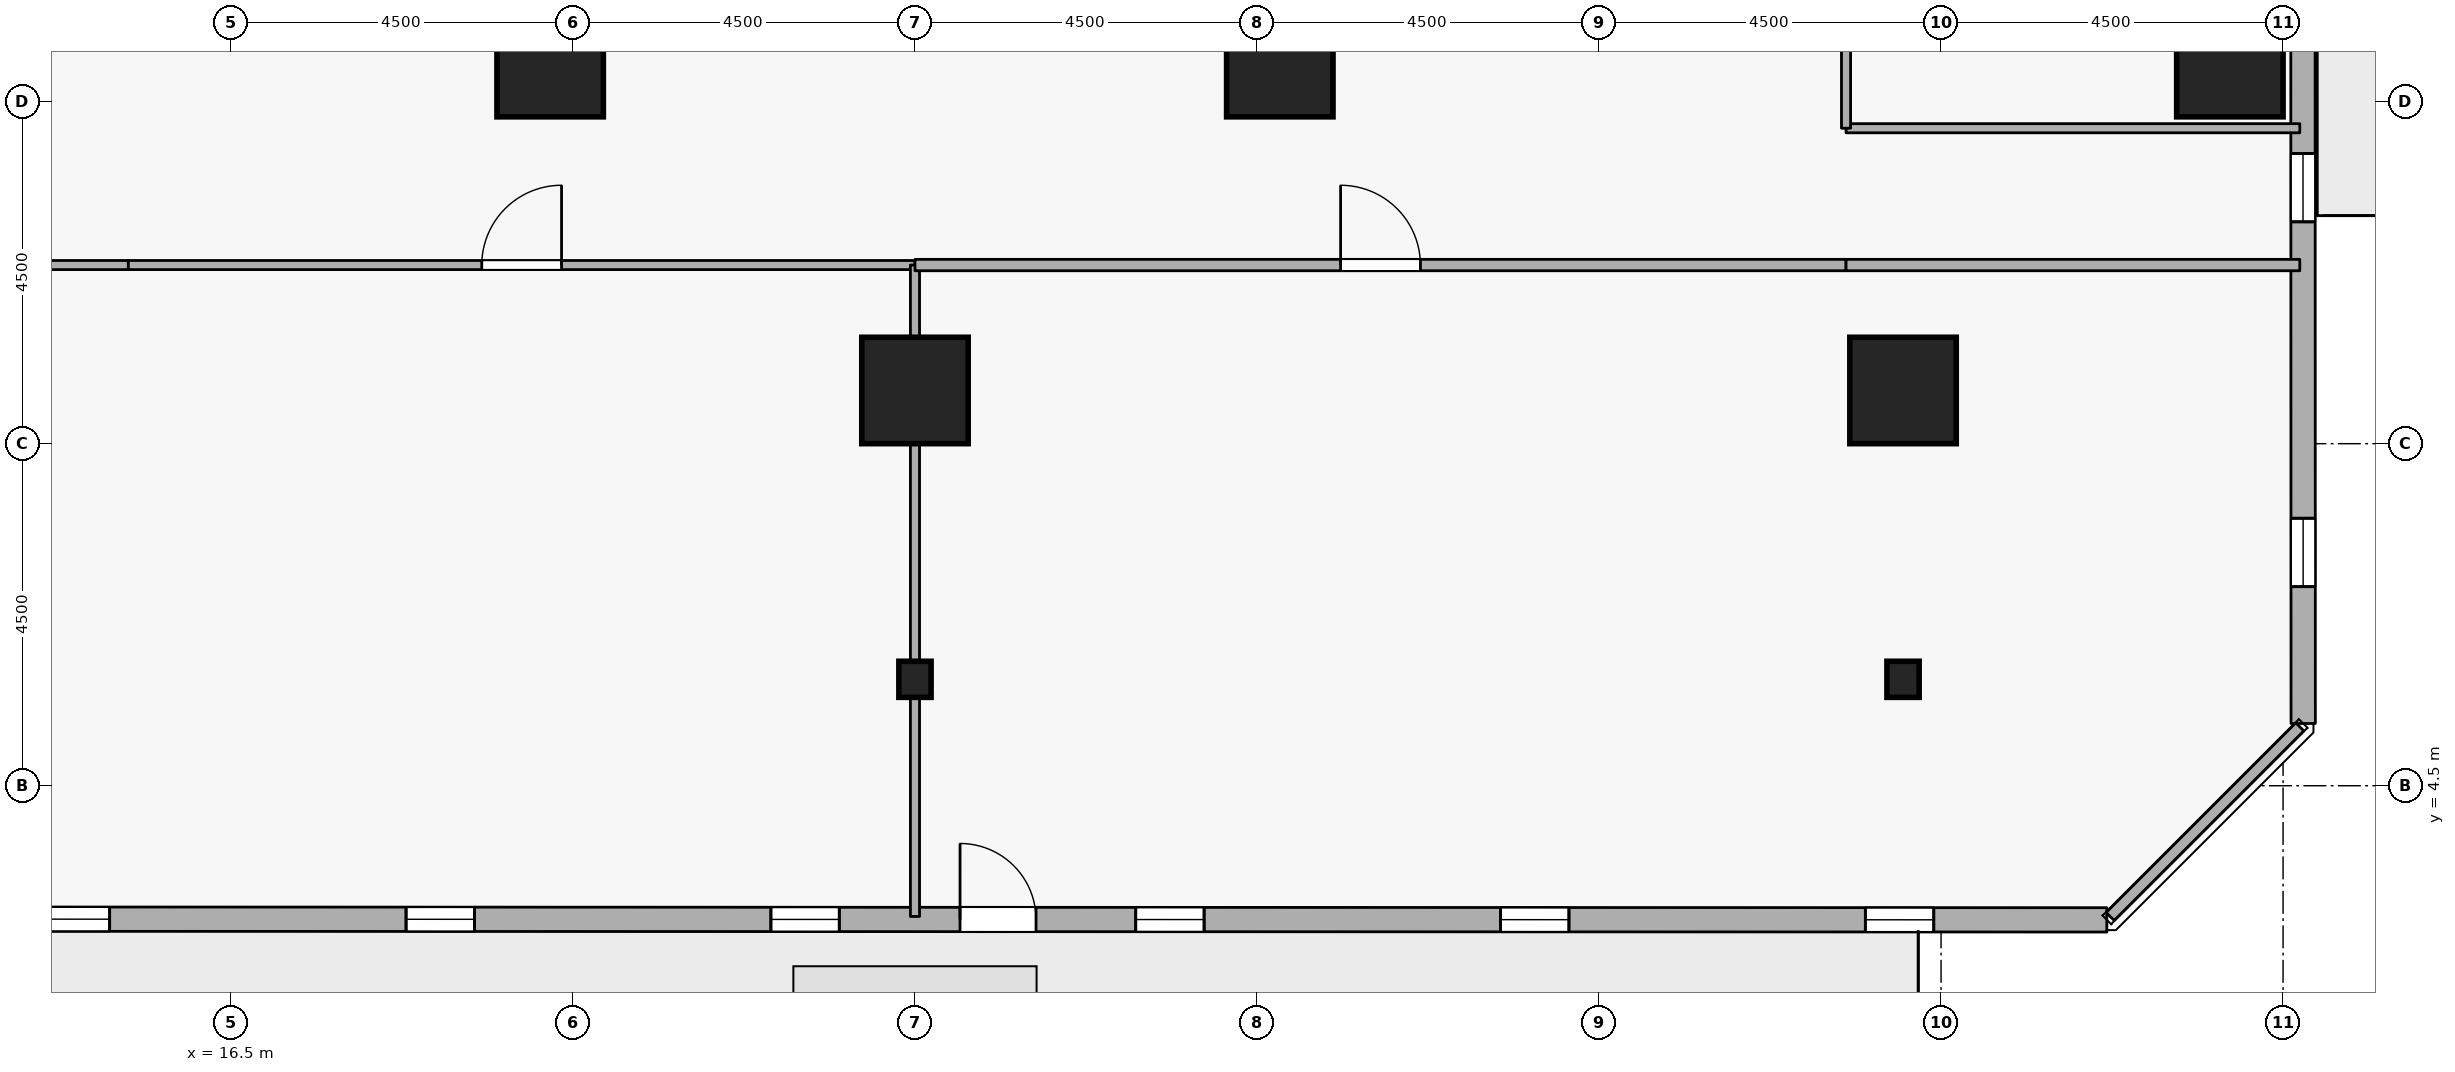
"""IFC4 building model, lengths in metres.
Left out: names, types, materials, properties, quantities, classifications, styles, units other than length and angle.
Written with IfcOpenShell. Run it as: python <this file> out.ifc"""

import sys

from ifc_helpers import new_model, si_unit, direction, frame, frame_2d, origin, origin_2d, place, context, subcontext, project, spatial, rectangle, i_section, extrude, element, fill, save


model = new_model("IFC4")
c1 = context("Model", 3, precision=1e-05, world=origin(), true_north=direction((0.0, 1.0)))
c2 = subcontext(c1, "Body", "Model", "MODEL_VIEW")
j1 = project(units=[si_unit("LENGTHUNIT", "METRE"), si_unit("PLANEANGLEUNIT", "RADIAN")], contexts=[c1])
p1 = place(None, origin())
s1 = spatial("IfcSite", under=j1, at=p1, CompositionType="ELEMENT")
p2 = place(p1, origin())
s2 = spatial("IfcBuilding", under=s1, at=p2, CompositionType="ELEMENT")
p3 = place(p2, frame((0.0, 0.0, 27.9)))
s3 = spatial("IfcBuildingStorey", under=s2, at=p3, CompositionType="ELEMENT", Elevation=27.9)
for number, where, z_axis, x_axis in (
    (1, (25.5, 9.7, 0.0), (0.0, 0.0, 1.0), (1.0, 0.0, 0.0)),
    (2, (38.5, 9.7, 0.0), (0.0, 0.0, 1.0), (1.0, 0.0, 0.0)),
    (3, (42.8, 14.0, 0.0), (0.0, 0.0, 1.0), (1.0, 0.0, 0.0)),
    (4, (20.7, 14.0, 0.0), (0.0, 0.0, 1.0), (1.0, 0.0, 0.0)),
    (5, (30.3, 14.0, 0.0), (0.0, 0.0, 1.0), (1.0, 0.0, 0.0)),
):
    element("IfcColumn", number, at=place(p3, frame(where, z_axis=z_axis, x_axis=x_axis)), inside=s3, PredefinedType="COLUMN", context=c2, shape_type="SweptSolid", body=[
        extrude(rectangle(XDim=1.4, YDim=1.4, at=origin_2d()), origin(), (0.0, 0.0, 1.0), 3.6),
    ])
for number, where, z_axis, x_axis in (
    (6, (25.5, 5.9, 0.0), (0.0, 0.0, 1.0), (1.0, 0.0, 0.0)),
    (7, (38.5, 5.9, 0.0), (0.0, 0.0, 1.0), (1.0, 0.0, 0.0)),
):
    element("IfcColumn", number, at=place(p3, frame(where, z_axis=z_axis, x_axis=x_axis)), inside=s3, PredefinedType="COLUMN", context=c2, shape_type="SweptSolid", body=[
        extrude(i_section(OverallWidth=0.424, OverallDepth=0.475, WebThickness=0.048, FlangeThickness=0.077, FilletRadius=0.015, at=origin_2d()), origin(), (0.0, 0.0, 1.0), 3.6),
    ])
p4 = place(p3, frame((7.404, 2.747, 0.0), z_axis=(0.0, 0.0, 1.0), x_axis=(0.999999942296, -0.000339718087, 0.0)))
e8 = element("IfcWall", 8, at=p4, inside=s3, PredefinedType="STANDARD", context=c2, shape_type="SweptSolid", body=[
    extrude(rectangle(XDim=33.777, YDim=0.32, at=frame_2d((16.888, 0.0))), origin(), (0.0, 0.0, 1.0), 2.7),
])
p5 = place(p4, frame((18.688, 0.0, 0.0)))
e9 = element("IfcOpeningElement", 9, at=p5, cuts=e8, PredefinedType="OPENING", context=c2, shape_type="SweptSolid", body=[
    extrude(rectangle(XDim=1.0, YDim=2.08, at=frame_2d((0.5, 1.04))), frame((0.0, 0.17, 0.0), z_axis=(0.0, -1.0, 0.0), x_axis=(1.0, 0.0, 0.0)), (0.0, 0.0, 1.0), 0.34),
])
p6 = place(p4, frame((1.8, 0.0, 0.72)))
e10 = element("IfcOpeningElement", 10, at=p6, cuts=e8, PredefinedType="OPENING", context=c2, shape_type="SweptSolid", body=[
    extrude(rectangle(XDim=0.9, YDim=1.75, at=frame_2d((0.45, 0.875))), frame((0.0, 0.17, 0.0), z_axis=(0.0, -1.0, 0.0), x_axis=(1.0, 0.0, 0.0)), (0.0, 0.0, 1.0), 0.34),
])
p7 = place(p4, frame((6.6, 0.0, 0.72)))
e11 = element("IfcOpeningElement", 11, at=p7, cuts=e8, PredefinedType="OPENING", context=c2, shape_type="SweptSolid", body=[
    extrude(rectangle(XDim=0.9, YDim=1.75, at=frame_2d((0.45, 0.875))), frame((0.0, 0.17, 0.0), z_axis=(0.0, -1.0, 0.0), x_axis=(1.0, 0.0, 0.0)), (0.0, 0.0, 1.0), 0.34),
])
p8 = place(p4, frame((11.4, 0.0, 0.72)))
e12 = element("IfcOpeningElement", 12, at=p8, cuts=e8, PredefinedType="OPENING", context=c2, shape_type="SweptSolid", body=[
    extrude(rectangle(XDim=0.9, YDim=1.75, at=frame_2d((0.45, 0.875))), frame((0.0, 0.17, 0.0), z_axis=(0.0, -1.0, 0.0), x_axis=(1.0, 0.0, 0.0)), (0.0, 0.0, 1.0), 0.34),
])
p9 = place(p4, frame((16.2, 0.0, 0.72)))
e13 = element("IfcOpeningElement", 13, at=p9, cuts=e8, PredefinedType="OPENING", context=c2, shape_type="SweptSolid", body=[
    extrude(rectangle(XDim=0.9, YDim=1.75, at=frame_2d((0.45, 0.875))), frame((0.0, 0.17, 0.0), z_axis=(0.0, -1.0, 0.0), x_axis=(1.0, 0.0, 0.0)), (0.0, 0.0, 1.0), 0.34),
])
p10 = place(p4, frame((21.0, 0.0, 0.72)))
e14 = element("IfcOpeningElement", 14, at=p10, cuts=e8, PredefinedType="OPENING", context=c2, shape_type="SweptSolid", body=[
    extrude(rectangle(XDim=0.9, YDim=1.75, at=frame_2d((0.45, 0.875))), frame((0.0, 0.17, 0.0), z_axis=(0.0, -1.0, 0.0), x_axis=(1.0, 0.0, 0.0)), (0.0, 0.0, 1.0), 0.34),
])
p11 = place(p4, frame((25.8, 0.0, 0.72)))
e15 = element("IfcOpeningElement", 15, at=p11, cuts=e8, PredefinedType="OPENING", context=c2, shape_type="SweptSolid", body=[
    extrude(rectangle(XDim=0.9, YDim=1.75, at=frame_2d((0.45, 0.875))), frame((0.0, 0.17, 0.0), z_axis=(0.0, -1.0, 0.0), x_axis=(1.0, 0.0, 0.0)), (0.0, 0.0, 1.0), 0.34),
])
p12 = place(p4, frame((30.6, 0.0, 0.72)))
e16 = element("IfcOpeningElement", 16, at=p12, cuts=e8, PredefinedType="OPENING", context=c2, shape_type="SweptSolid", body=[
    extrude(rectangle(XDim=0.9, YDim=1.75, at=frame_2d((0.45, 0.875))), frame((0.0, 0.17, 0.0), z_axis=(0.0, -1.0, 0.0), x_axis=(1.0, 0.0, 0.0)), (0.0, 0.0, 1.0), 0.34),
])
p13 = place(p3, frame((43.765, 5.319, 0.0), z_axis=(0.0, 0.0, 1.0), x_axis=(-0.000339718087, 0.999999942296, 0.0)))
e17 = element("IfcWall", 17, at=p13, inside=s3, PredefinedType="STANDARD", context=c2, shape_type="SweptSolid", body=[
    extrude(rectangle(XDim=33.777, YDim=0.32, at=frame_2d((16.888, 0.0))), origin(), (0.0, 0.0, 1.0), 2.7),
])
p14 = place(p13, frame((18.614, 0.0, 0.0)))
e18 = element("IfcOpeningElement", 18, at=p14, cuts=e17, PredefinedType="OPENING", context=c2, shape_type="SweptSolid", body=[
    extrude(rectangle(XDim=1.15, YDim=2.1, at=frame_2d((0.575, 1.05))), frame((0.0, 0.17, 0.0), z_axis=(0.0, -1.0, 0.0), x_axis=(1.0, 0.0, 0.0)), (0.0, 0.0, 1.0), 0.34),
])
p15 = place(p13, frame((1.8, 0.0, 0.72)))
e19 = element("IfcOpeningElement", 19, at=p15, cuts=e17, PredefinedType="OPENING", context=c2, shape_type="SweptSolid", body=[
    extrude(rectangle(XDim=0.9, YDim=1.75, at=frame_2d((0.45, 0.875))), frame((0.0, 0.17, 0.0), z_axis=(0.0, -1.0, 0.0), x_axis=(1.0, 0.0, 0.0)), (0.0, 0.0, 1.0), 0.34),
])
p16 = place(p13, frame((6.6, 0.0, 0.72)))
e20 = element("IfcOpeningElement", 20, at=p16, cuts=e17, PredefinedType="OPENING", context=c2, shape_type="SweptSolid", body=[
    extrude(rectangle(XDim=0.9, YDim=1.75, at=frame_2d((0.45, 0.875))), frame((0.0, 0.17, 0.0), z_axis=(0.0, -1.0, 0.0), x_axis=(1.0, 0.0, 0.0)), (0.0, 0.0, 1.0), 0.34),
])
p17 = place(p13, frame((11.4, 0.0, 0.72)))
e21 = element("IfcOpeningElement", 21, at=p17, cuts=e17, PredefinedType="OPENING", context=c2, shape_type="SweptSolid", body=[
    extrude(rectangle(XDim=0.9, YDim=1.75, at=frame_2d((0.45, 0.875))), frame((0.0, 0.17, 0.0), z_axis=(0.0, -1.0, 0.0), x_axis=(1.0, 0.0, 0.0)), (0.0, 0.0, 1.0), 0.34),
])
p18 = place(p13, frame((16.2, 0.0, 0.72)))
e22 = element("IfcOpeningElement", 22, at=p18, cuts=e17, PredefinedType="OPENING", context=c2, shape_type="SweptSolid", body=[
    extrude(rectangle(XDim=0.9, YDim=1.75, at=frame_2d((0.45, 0.875))), frame((0.0, 0.17, 0.0), z_axis=(0.0, -1.0, 0.0), x_axis=(1.0, 0.0, 0.0)), (0.0, 0.0, 1.0), 0.34),
])
p19 = place(p13, frame((25.8, 0.0, 0.72)))
e23 = element("IfcOpeningElement", 23, at=p19, cuts=e17, PredefinedType="OPENING", context=c2, shape_type="SweptSolid", body=[
    extrude(rectangle(XDim=0.9, YDim=1.75, at=frame_2d((0.45, 0.875))), frame((0.0, 0.17, 0.0), z_axis=(0.0, -1.0, 0.0), x_axis=(1.0, 0.0, 0.0)), (0.0, 0.0, 1.0), 0.34),
])
p20 = place(p13, frame((30.6, 0.0, 0.72)))
e24 = element("IfcOpeningElement", 24, at=p20, cuts=e17, PredefinedType="OPENING", context=c2, shape_type="SweptSolid", body=[
    extrude(rectangle(XDim=0.9, YDim=1.75, at=frame_2d((0.45, 0.875))), frame((0.0, 0.17, 0.0), z_axis=(0.0, -1.0, 0.0), x_axis=(1.0, 0.0, 0.0)), (0.0, 0.0, 1.0), 0.34),
])
p21 = place(p3, frame((43.72, 13.15, 0.0), z_axis=(0.0, 0.0, 1.0), x_axis=(-1.0, 0.0, 0.0)))
e25 = element("IfcWall", 25, at=p21, inside=s3, PredefinedType="PARTITIONING", context=c2, shape_type="SweptSolid", body=[
    extrude(rectangle(XDim=5.97, YDim=0.12, at=frame_2d((2.985, 0.0))), origin(), (0.0, 0.0, 1.0), 3.34),
])
p22 = place(p3, frame((37.75, 13.15, 0.0), z_axis=(0.0, 0.0, 1.0), x_axis=(0.0, 1.0, 0.0)))
e26 = element("IfcWall", 26, at=p22, inside=s3, PredefinedType="PARTITIONING", context=c2, shape_type="SweptSolid", body=[
    extrude(rectangle(XDim=1.862, YDim=0.12, at=frame_2d((0.931, 0.0))), origin(), (0.0, 0.0, 1.0), 3.34),
])
p23 = place(p3, frame((13.25, 11.35, 0.0), z_axis=(0.0, 0.0, 1.0), x_axis=(1.0, 0.0, 0.0)))
e27 = element("IfcWall", 27, at=p23, inside=s3, PredefinedType="PARTITIONING", context=c2, shape_type="SweptSolid", body=[
    extrude(rectangle(XDim=1.9, YDim=0.12, at=frame_2d((0.95, 0.0))), origin(), (0.0, 0.0, 1.0), 3.34),
])
p24 = place(p3, frame((15.15, 11.35, 0.0), z_axis=(0.0, 0.0, 1.0), x_axis=(1.0, 0.0, 0.0)))
e28 = element("IfcWall", 28, at=p24, inside=s3, PredefinedType="PARTITIONING", context=c2, shape_type="SweptSolid", body=[
    extrude(rectangle(XDim=10.35, YDim=0.12, at=frame_2d((5.175, 0.0))), origin(), (0.0, 0.0, 1.0), 3.34),
])
p25 = place(p24, frame((4.65, 0.0, 0.0)))
e29 = element("IfcOpeningElement", 29, at=p25, cuts=e28, PredefinedType="OPENING", context=c2, shape_type="SweptSolid", body=[
    extrude(rectangle(XDim=1.05, YDim=2.1, at=frame_2d((0.525, 1.05))), frame((0.0, 0.07, 0.0), z_axis=(0.0, -1.0, 0.0), x_axis=(1.0, 0.0, 0.0)), (0.0, 0.0, 1.0), 0.14),
])
p26 = place(p3, frame((25.5, 11.35, 0.0), z_axis=(0.0, 0.0, 1.0), x_axis=(0.0, -1.0, 0.0)))
e30 = element("IfcWall", 30, at=p26, inside=s3, PredefinedType="PARTITIONING", context=c2, shape_type="SweptSolid", body=[
    extrude(rectangle(XDim=8.57, YDim=0.12, at=frame_2d((4.285, 0.0))), origin(), (0.0, 0.0, 1.0), 2.878),
])
p27 = place(p3, frame((25.5, 11.35, 0.0), z_axis=(0.0, 0.0, 1.0), x_axis=(1.0, 0.0, 0.0)))
e31 = element("IfcWall", 31, at=p27, inside=s3, PredefinedType="PARTITIONING", context=c2, shape_type="SweptSolid", body=[
    extrude(rectangle(XDim=12.25, YDim=0.15, at=frame_2d((6.125, 0.0))), origin(), (0.0, 0.0, 1.0), 3.34),
])
p28 = place(p27, frame((5.6, 0.0, 0.0)))
e32 = element("IfcOpeningElement", 32, at=p28, cuts=e31, PredefinedType="OPENING", context=c2, shape_type="SweptSolid", body=[
    extrude(rectangle(XDim=1.05, YDim=2.1, at=frame_2d((0.525, 1.05))), frame((0.0, 0.085, 0.0), z_axis=(0.0, -1.0, 0.0), x_axis=(1.0, 0.0, 0.0)), (0.0, 0.0, 1.0), 0.17),
])
p29 = place(p3, frame((37.75, 11.35, 0.0), z_axis=(0.0, 0.0, 1.0), x_axis=(1.0, 0.0, 0.0)))
e33 = element("IfcWall", 33, at=p29, inside=s3, PredefinedType="PARTITIONING", context=c2, shape_type="SweptSolid", body=[
    extrude(rectangle(XDim=5.97, YDim=0.15, at=frame_2d((2.985, 0.0))), origin(), (0.0, 0.0, 1.0), 3.34),
])
p30 = place(p3, frame((43.72, 5.275, 0.0), z_axis=(0.0, 0.0, 1.0), x_axis=(-0.707106781187, -0.707106781187, 0.0)))
e34 = element("IfcWall", 34, at=p30, inside=s3, PredefinedType="PARTITIONING", context=c2, shape_type="SweptSolid", body=[
    extrude(rectangle(XDim=3.528, YDim=0.15, at=frame_2d((1.764, 0.0))), origin(), (0.0, 0.0, 1.0), 3.34),
])
p31 = place(p5, origin())
e35 = element("IfcDoor", 35, at=p31, inside=s3, OperationType="SINGLE_SWING_LEFT", PredefinedType="DOOR", context=c2, shape_type="SweptSolid", body=[
    extrude(rectangle(XDim=1.0, YDim=2.08, at=frame_2d((0.5, 1.04))), frame((0.0, 0.025, 0.0), z_axis=(0.0, -1.0, 0.0), x_axis=(1.0, 0.0, 0.0)), (0.0, 0.0, 1.0), 0.05),
])
fill(e9, e35)
p32 = place(p7, origin())
e36 = element("IfcWindow", 36, at=p32, inside=s3, PartitioningType="SINGLE_PANEL", PredefinedType="WINDOW", context=c2, shape_type="SweptSolid", body=[
    extrude(rectangle(XDim=0.9, YDim=1.75, at=frame_2d((0.45, 0.875))), frame((0.0, 0.03, 0.0), z_axis=(0.0, -1.0, 0.0), x_axis=(1.0, 0.0, 0.0)), (0.0, 0.0, 1.0), 0.06),
])
fill(e11, e36)
p33 = place(p8, origin())
e37 = element("IfcWindow", 37, at=p33, inside=s3, PartitioningType="SINGLE_PANEL", PredefinedType="WINDOW", context=c2, shape_type="SweptSolid", body=[
    extrude(rectangle(XDim=0.9, YDim=1.75, at=frame_2d((0.45, 0.875))), frame((0.0, 0.03, 0.0), z_axis=(0.0, -1.0, 0.0), x_axis=(1.0, 0.0, 0.0)), (0.0, 0.0, 1.0), 0.06),
])
fill(e12, e37)
p34 = place(p9, origin())
e38 = element("IfcWindow", 38, at=p34, inside=s3, PartitioningType="SINGLE_PANEL", PredefinedType="WINDOW", context=c2, shape_type="SweptSolid", body=[
    extrude(rectangle(XDim=0.9, YDim=1.75, at=frame_2d((0.45, 0.875))), frame((0.0, 0.03, 0.0), z_axis=(0.0, -1.0, 0.0), x_axis=(1.0, 0.0, 0.0)), (0.0, 0.0, 1.0), 0.06),
])
fill(e13, e38)
p35 = place(p10, origin())
e39 = element("IfcWindow", 39, at=p35, inside=s3, PartitioningType="SINGLE_PANEL", PredefinedType="WINDOW", context=c2, shape_type="SweptSolid", body=[
    extrude(rectangle(XDim=0.9, YDim=1.75, at=frame_2d((0.45, 0.875))), frame((0.0, 0.03, 0.0), z_axis=(0.0, -1.0, 0.0), x_axis=(1.0, 0.0, 0.0)), (0.0, 0.0, 1.0), 0.06),
])
fill(e14, e39)
p36 = place(p11, origin())
e40 = element("IfcWindow", 40, at=p36, inside=s3, PartitioningType="SINGLE_PANEL", PredefinedType="WINDOW", context=c2, shape_type="SweptSolid", body=[
    extrude(rectangle(XDim=0.9, YDim=1.75, at=frame_2d((0.45, 0.875))), frame((0.0, 0.03, 0.0), z_axis=(0.0, -1.0, 0.0), x_axis=(1.0, 0.0, 0.0)), (0.0, 0.0, 1.0), 0.06),
])
fill(e15, e40)
p37 = place(p12, origin())
e41 = element("IfcWindow", 41, at=p37, inside=s3, PartitioningType="SINGLE_PANEL", PredefinedType="WINDOW", context=c2, shape_type="SweptSolid", body=[
    extrude(rectangle(XDim=0.9, YDim=1.75, at=frame_2d((0.45, 0.875))), frame((0.0, 0.03, 0.0), z_axis=(0.0, -1.0, 0.0), x_axis=(1.0, 0.0, 0.0)), (0.0, 0.0, 1.0), 0.06),
])
fill(e16, e41)
p38 = place(p15, origin())
e42 = element("IfcWindow", 42, at=p38, inside=s3, PartitioningType="SINGLE_PANEL", PredefinedType="WINDOW", context=c2, shape_type="SweptSolid", body=[
    extrude(rectangle(XDim=0.9, YDim=1.75, at=frame_2d((0.45, 0.875))), frame((0.0, 0.03, 0.0), z_axis=(0.0, -1.0, 0.0), x_axis=(1.0, 0.0, 0.0)), (0.0, 0.0, 1.0), 0.06),
])
fill(e19, e42)
p39 = place(p16, origin())
e43 = element("IfcWindow", 43, at=p39, inside=s3, PartitioningType="SINGLE_PANEL", PredefinedType="WINDOW", context=c2, shape_type="SweptSolid", body=[
    extrude(rectangle(XDim=0.9, YDim=1.75, at=frame_2d((0.45, 0.875))), frame((0.0, 0.03, 0.0), z_axis=(0.0, -1.0, 0.0), x_axis=(1.0, 0.0, 0.0)), (0.0, 0.0, 1.0), 0.06),
])
fill(e20, e43)
p40 = place(p25, origin())
e44 = element("IfcDoor", 44, at=p40, inside=s3, OperationType="SINGLE_SWING_RIGHT", PredefinedType="DOOR", context=c2, shape_type="SweptSolid", body=[
    extrude(rectangle(XDim=1.05, YDim=2.1, at=frame_2d((0.525, 1.05))), frame((0.0, 0.025, 0.0), z_axis=(0.0, -1.0, 0.0), x_axis=(1.0, 0.0, 0.0)), (0.0, 0.0, 1.0), 0.05),
])
fill(e29, e44)
p41 = place(p28, origin())
e45 = element("IfcDoor", 45, at=p41, inside=s3, OperationType="SINGLE_SWING_LEFT", PredefinedType="DOOR", context=c2, shape_type="SweptSolid", body=[
    extrude(rectangle(XDim=1.05, YDim=2.1, at=frame_2d((0.525, 1.05))), frame((0.0, 0.025, 0.0), z_axis=(0.0, -1.0, 0.0), x_axis=(1.0, 0.0, 0.0)), (0.0, 0.0, 1.0), 0.05),
])
fill(e32, e45)
save(model, sys.argv[1])
